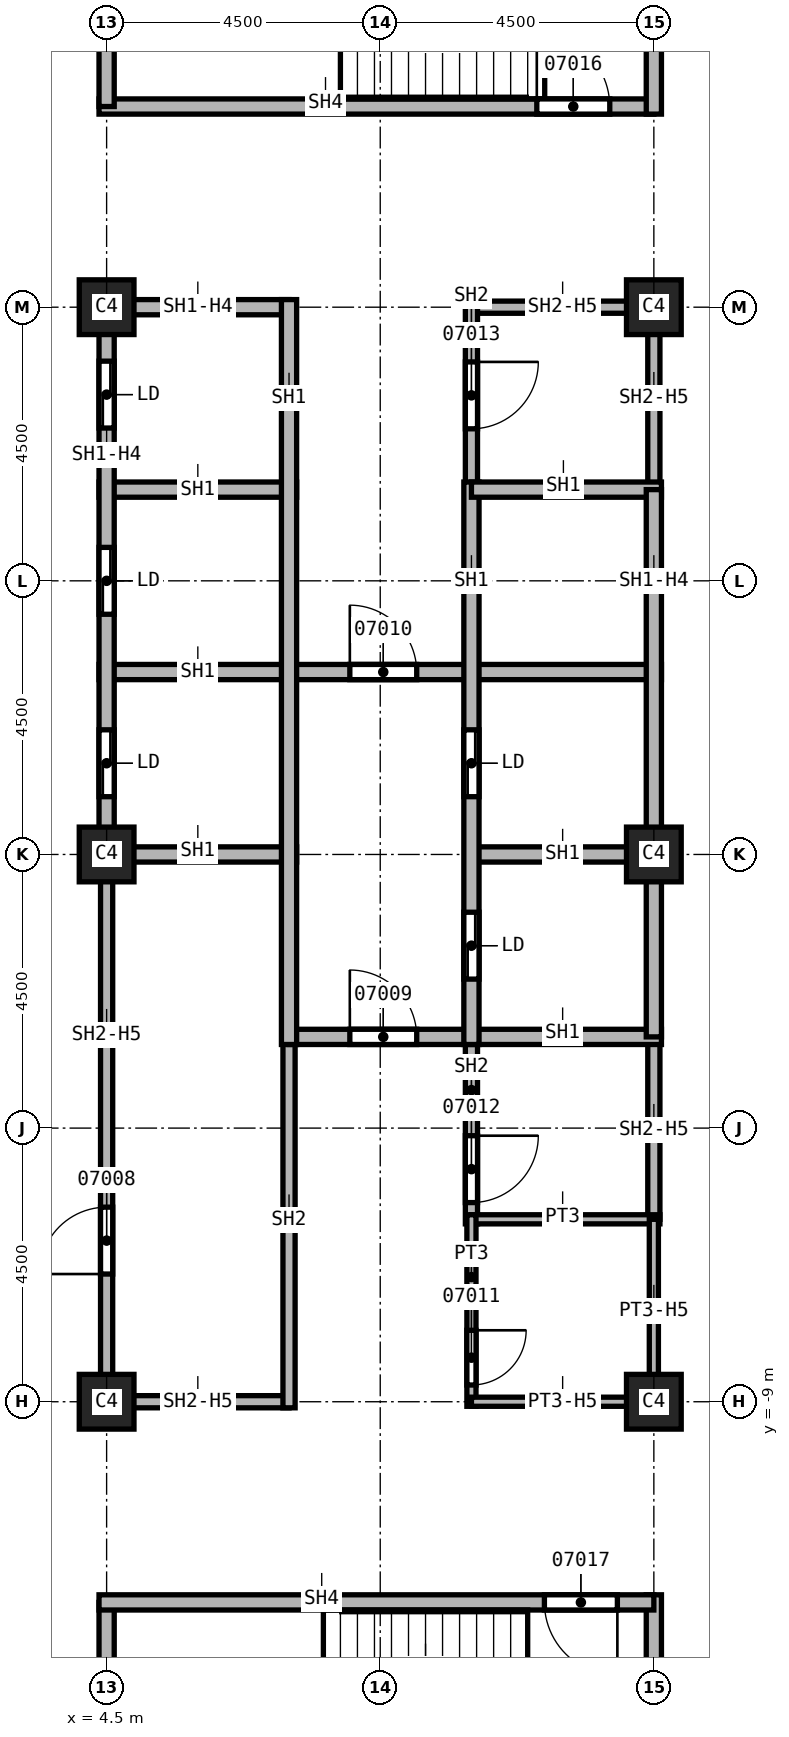
"""IFC4 building model, lengths in metres.
Left out: names, types, materials, properties, quantities, classifications, styles, units other than length and angle.
Written with IfcOpenShell. Run it as: python <this file> out.ifc"""

import sys

from ifc_helpers import new_model, si_unit, direction, frame, frame_2d, origin, origin_2d, place, context, subcontext, project, spatial, rectangle, extrude, element, fill, save


model = new_model("IFC4")
c1 = context("Model", 3, precision=1e-05, world=origin(), true_north=direction((0.0, 1.0)))
c2 = subcontext(c1, "Body", "Model", "MODEL_VIEW")
j1 = project(units=[si_unit("LENGTHUNIT", "METRE"), si_unit("PLANEANGLEUNIT", "RADIAN")], contexts=[c1])
p1 = place(None, origin())
s1 = spatial("IfcSite", under=j1, at=p1, CompositionType="ELEMENT")
p2 = place(p1, origin())
s2 = spatial("IfcBuilding", under=s1, at=p2, CompositionType="ELEMENT")
p3 = place(p2, frame((0.0, 0.0, 138.0)))
s3 = spatial("IfcBuildingStorey", under=s2, at=p3, CompositionType="ELEMENT", Elevation=138.0)
for number, where, z_axis, x_axis in (
    (1, (4.5, 0.0, 0.0), (0.0, 0.0, 1.0), (1.0, 0.0, 0.0)),
    (2, (4.5, 9.0, 0.0), (0.0, 0.0, 1.0), (1.0, 0.0, 0.0)),
    (3, (4.5, -9.0, 0.0), (0.0, 0.0, 1.0), (1.0, 0.0, 0.0)),
    (4, (13.5, 0.0, 0.0), (0.0, 0.0, 1.0), (1.0, 0.0, 0.0)),
    (5, (13.5, 9.0, 0.0), (0.0, 0.0, 1.0), (1.0, 0.0, 0.0)),
    (6, (13.5, -9.0, 0.0), (0.0, 0.0, 1.0), (1.0, 0.0, 0.0)),
):
    element("IfcColumn", number, at=place(p3, frame(where, z_axis=z_axis, x_axis=x_axis)), inside=s3, PredefinedType="COLUMN", context=c2, shape_type="SweptSolid", body=[
        extrude(rectangle(XDim=0.9, YDim=0.9, at=origin_2d()), origin(), (0.0, 0.0, 1.0), 3.7),
    ])
p4 = place(p3, frame((4.5, -9.1, 0.0), z_axis=(0.0, 0.0, 1.0), x_axis=(0.0, 1.0, 0.0)))
e7 = element("IfcWall", 7, at=p4, inside=s3, PredefinedType="SOLIDWALL", context=c2, shape_type="SweptSolid", body=[
    extrude(rectangle(XDim=9.1, YDim=0.2, at=frame_2d((4.55, 0.0))), origin(), (0.0, 0.0, 1.0), 2.938),
])
p5 = place(p4, frame((2.2, 0.0, 0.0)))
e8 = element("IfcOpeningElement", 8, at=p5, cuts=e7, PredefinedType="OPENING", context=c2, shape_type="SweptSolid", body=[
    extrude(rectangle(XDim=1.1, YDim=2.1, at=frame_2d((0.55, 1.05))), frame((0.0, 0.1, 0.0), z_axis=(0.0, -1.0, 0.0), x_axis=(1.0, 0.0, 0.0)), (0.0, 0.0, 1.0), 0.2),
])
p6 = place(p3, frame((7.5, -9.0, 0.0), z_axis=(0.0, 0.0, 1.0), x_axis=(-1.0, 0.0, 0.0)))
e9 = element("IfcWall", 9, at=p6, inside=s3, PredefinedType="SOLIDWALL", context=c2, shape_type="SweptSolid", body=[
    extrude(rectangle(XDim=3.0, YDim=0.2, at=frame_2d((1.5, 0.0))), origin(), (0.0, 0.0, 1.0), 2.938),
])
p7 = place(p3, frame((7.5, -2.875, 0.0), z_axis=(0.0, 0.0, 1.0), x_axis=(0.0, -1.0, 0.0)))
e10 = element("IfcWall", 10, at=p7, inside=s3, PredefinedType="SOLIDWALL", context=c2, shape_type="SweptSolid", body=[
    extrude(rectangle(XDim=6.225, YDim=0.2, at=frame_2d((3.113, 0.0))), origin(), (0.0, 0.0, 1.0), 3.7),
])
p8 = place(p3, frame((10.5, -2.875, 0.0), z_axis=(0.0, 0.0, 1.0), x_axis=(0.0, -1.0, 0.0)))
e11 = element("IfcWall", 11, at=p8, inside=s3, PredefinedType="SOLIDWALL", context=c2, shape_type="SweptSolid", body=[
    extrude(rectangle(XDim=3.2, YDim=0.2, at=frame_2d((1.6, 0.0))), origin(), (0.0, 0.0, 1.0), 3.7),
])
p9 = place(p8, frame((1.75, 0.0, 0.0)))
e12 = element("IfcOpeningElement", 12, at=p9, cuts=e11, PredefinedType="OPENING", context=c2, shape_type="SweptSolid", body=[
    extrude(rectangle(XDim=1.1, YDim=2.1, at=frame_2d((0.55, 1.05))), frame((0.0, 0.1, 0.0), z_axis=(0.0, -1.0, 0.0), x_axis=(1.0, 0.0, 0.0)), (0.0, 0.0, 1.0), 0.2),
])
p10 = place(p3, frame((10.5, 9.0, 0.0), z_axis=(0.0, 0.0, 1.0), x_axis=(1.0, 0.0, 0.0)))
e13 = element("IfcWall", 13, at=p10, inside=s3, PredefinedType="SOLIDWALL", context=c2, shape_type="SweptSolid", body=[
    extrude(rectangle(XDim=3.0, YDim=0.2, at=frame_2d((1.5, 0.0))), origin(), (0.0, 0.0, 1.0), 2.938),
])
p11 = place(p3, frame((10.5, 9.1, 0.0), z_axis=(0.0, 0.0, 1.0), x_axis=(0.0, -1.0, 0.0)))
e14 = element("IfcWall", 14, at=p11, inside=s3, PredefinedType="SOLIDWALL", context=c2, shape_type="SweptSolid", body=[
    extrude(rectangle(XDim=3.225, YDim=0.2, at=frame_2d((1.613, 0.0))), origin(), (0.0, 0.0, 1.0), 3.7),
])
p12 = place(p11, frame((1.0, 0.0, 0.0)))
e15 = element("IfcOpeningElement", 15, at=p12, cuts=e14, PredefinedType="OPENING", context=c2, shape_type="SweptSolid", body=[
    extrude(rectangle(XDim=1.1, YDim=2.1, at=frame_2d((0.55, 1.05))), frame((0.0, 0.1, 0.0), z_axis=(0.0, -1.0, 0.0), x_axis=(1.0, 0.0, 0.0)), (0.0, 0.0, 1.0), 0.2),
])
p13 = place(p3, frame((13.5, -3.0, 0.0), z_axis=(0.0, 0.0, 1.0), x_axis=(0.0, -1.0, 0.0)))
e16 = element("IfcWall", 16, at=p13, inside=s3, PredefinedType="SOLIDWALL", context=c2, shape_type="SweptSolid", body=[
    extrude(rectangle(XDim=3.0, YDim=0.2, at=frame_2d((1.5, 0.0))), origin(), (0.0, 0.0, 1.0), 2.938),
])
p14 = place(p3, frame((13.5, 9.1, 0.0), z_axis=(0.0, 0.0, 1.0), x_axis=(0.0, -1.0, 0.0)))
e17 = element("IfcWall", 17, at=p14, inside=s3, PredefinedType="SOLIDWALL", context=c2, shape_type="SweptSolid", body=[
    extrude(rectangle(XDim=3.1, YDim=0.2, at=frame_2d((1.55, 0.0))), origin(), (0.0, 0.0, 1.0), 2.938),
])
p15 = place(p3, frame((4.375, 0.0, 0.0), z_axis=(0.0, 0.0, 1.0), x_axis=(1.0, 0.0, 0.0)))
e18 = element("IfcWall", 18, at=p15, inside=s3, PredefinedType="SOLIDWALL", context=c2, shape_type="SweptSolid", body=[
    extrude(rectangle(XDim=3.25, YDim=0.25, at=frame_2d((1.625, 0.0))), origin(), (0.0, 0.0, 1.0), 3.7),
])
p16 = place(p3, frame((4.375, 3.0, 0.0), z_axis=(0.0, 0.0, 1.0), x_axis=(1.0, 0.0, 0.0)))
e19 = element("IfcWall", 19, at=p16, inside=s3, PredefinedType="SOLIDWALL", context=c2, shape_type="SweptSolid", body=[
    extrude(rectangle(XDim=9.25, YDim=0.25, at=frame_2d((4.625, 0.0))), origin(), (0.0, 0.0, 1.0), 3.7),
])
p17 = place(p16, frame((4.125, 0.0, 0.0)))
e20 = element("IfcOpeningElement", 20, at=p17, cuts=e19, PredefinedType="OPENING", context=c2, shape_type="SweptSolid", body=[
    extrude(rectangle(XDim=1.1, YDim=2.1, at=frame_2d((0.55, 1.05))), frame((0.0, 0.125, 0.0), z_axis=(0.0, -1.0, 0.0), x_axis=(1.0, 0.0, 0.0)), (0.0, 0.0, 1.0), 0.25),
])
p18 = place(p3, frame((4.375, 6.0, 0.0), z_axis=(0.0, 0.0, 1.0), x_axis=(1.0, 0.0, 0.0)))
e21 = element("IfcWall", 21, at=p18, inside=s3, PredefinedType="SOLIDWALL", context=c2, shape_type="SweptSolid", body=[
    extrude(rectangle(XDim=3.25, YDim=0.25, at=frame_2d((1.625, 0.0))), origin(), (0.0, 0.0, 1.0), 3.7),
])
p19 = place(p3, frame((4.5, 0.0, 0.0), z_axis=(0.0, 0.0, 1.0), x_axis=(0.0, 1.0, 0.0)))
e22 = element("IfcWall", 22, at=p19, inside=s3, PredefinedType="SOLIDWALL", context=c2, shape_type="SweptSolid", body=[
    extrude(rectangle(XDim=9.125, YDim=0.25, at=frame_2d((4.562, 0.0))), origin(), (0.0, 0.0, 1.0), 2.938),
])
p20 = place(p19, frame((0.95, 0.0, 0.0)))
e23 = element("IfcOpeningElement", 23, at=p20, cuts=e22, PredefinedType="OPENING", context=c2, shape_type="SweptSolid", body=[
    extrude(rectangle(XDim=1.1, YDim=2.1, at=frame_2d((0.55, 1.05))), frame((0.0, 0.125, 0.0), z_axis=(0.0, -1.0, 0.0), x_axis=(1.0, 0.0, 0.0)), (0.0, 0.0, 1.0), 0.25),
])
p21 = place(p19, frame((3.95, 0.0, 0.0)))
e24 = element("IfcOpeningElement", 24, at=p21, cuts=e22, PredefinedType="OPENING", context=c2, shape_type="SweptSolid", body=[
    extrude(rectangle(XDim=1.1, YDim=2.1, at=frame_2d((0.55, 1.05))), frame((0.0, 0.125, 0.0), z_axis=(0.0, -1.0, 0.0), x_axis=(1.0, 0.0, 0.0)), (0.0, 0.0, 1.0), 0.25),
])
p22 = place(p19, frame((7.012, 0.0, 0.0)))
e25 = element("IfcOpeningElement", 25, at=p22, cuts=e22, PredefinedType="OPENING", context=c2, shape_type="SweptSolid", body=[
    extrude(rectangle(XDim=1.1, YDim=2.1, at=frame_2d((0.55, 1.05))), frame((0.0, 0.125, 0.0), z_axis=(0.0, -1.0, 0.0), x_axis=(1.0, 0.0, 0.0)), (0.0, 0.0, 1.0), 0.25),
])
p23 = place(p3, frame((4.5, 9.0, 0.0), z_axis=(0.0, 0.0, 1.0), x_axis=(1.0, 0.0, 0.0)))
e26 = element("IfcWall", 26, at=p23, inside=s3, PredefinedType="SOLIDWALL", context=c2, shape_type="SweptSolid", body=[
    extrude(rectangle(XDim=3.0, YDim=0.25, at=frame_2d((1.5, 0.0))), origin(), (0.0, 0.0, 1.0), 2.938),
])
p24 = place(p3, frame((7.5, -3.0, 0.0), z_axis=(0.0, 0.0, 1.0), x_axis=(1.0, 0.0, 0.0)))
e27 = element("IfcWall", 27, at=p24, inside=s3, PredefinedType="SOLIDWALL", context=c2, shape_type="SweptSolid", body=[
    extrude(rectangle(XDim=6.125, YDim=0.25, at=frame_2d((3.062, 0.0))), origin(), (0.0, 0.0, 1.0), 3.7),
])
p25 = place(p24, frame((1.0, 0.0, 0.0)))
e28 = element("IfcOpeningElement", 28, at=p25, cuts=e27, PredefinedType="OPENING", context=c2, shape_type="SweptSolid", body=[
    extrude(rectangle(XDim=1.1, YDim=2.1, at=frame_2d((0.55, 1.05))), frame((0.0, 0.125, 0.0), z_axis=(0.0, -1.0, 0.0), x_axis=(1.0, 0.0, 0.0)), (0.0, 0.0, 1.0), 0.25),
])
p26 = place(p3, frame((7.5, 9.125, 0.0), z_axis=(0.0, 0.0, 1.0), x_axis=(0.0, -1.0, 0.0)))
e29 = element("IfcWall", 29, at=p26, inside=s3, PredefinedType="SOLIDWALL", context=c2, shape_type="SweptSolid", body=[
    extrude(rectangle(XDim=12.25, YDim=0.25, at=frame_2d((6.125, 0.0))), origin(), (0.0, 0.0, 1.0), 3.7),
])
p27 = place(p3, frame((10.5, 0.0, 0.0), z_axis=(0.0, 0.0, 1.0), x_axis=(1.0, 0.0, 0.0)))
e30 = element("IfcWall", 30, at=p27, inside=s3, PredefinedType="SOLIDWALL", context=c2, shape_type="SweptSolid", body=[
    extrude(rectangle(XDim=3.125, YDim=0.25, at=frame_2d((1.562, 0.0))), origin(), (0.0, 0.0, 1.0), 3.7),
])
p28 = place(p3, frame((10.5, 6.125, 0.0), z_axis=(0.0, 0.0, 1.0), x_axis=(0.0, -1.0, 0.0)))
e31 = element("IfcWall", 31, at=p28, inside=s3, PredefinedType="SOLIDWALL", context=c2, shape_type="SweptSolid", body=[
    extrude(rectangle(XDim=9.25, YDim=0.25, at=frame_2d((4.625, 0.0))), origin(), (0.0, 0.0, 1.0), 3.7),
])
p29 = place(p28, frame((7.075, 0.0, 0.0)))
e32 = element("IfcOpeningElement", 32, at=p29, cuts=e31, PredefinedType="OPENING", context=c2, shape_type="SweptSolid", body=[
    extrude(rectangle(XDim=1.1, YDim=2.1, at=frame_2d((0.55, 1.05))), frame((0.0, 0.125, 0.0), z_axis=(0.0, -1.0, 0.0), x_axis=(1.0, 0.0, 0.0)), (0.0, 0.0, 1.0), 0.25),
])
p30 = place(p28, frame((4.075, 0.0, 0.0)))
e33 = element("IfcOpeningElement", 33, at=p30, cuts=e31, PredefinedType="OPENING", context=c2, shape_type="SweptSolid", body=[
    extrude(rectangle(XDim=1.1, YDim=2.1, at=frame_2d((0.55, 1.05))), frame((0.0, 0.125, 0.0), z_axis=(0.0, -1.0, 0.0), x_axis=(1.0, 0.0, 0.0)), (0.0, 0.0, 1.0), 0.25),
])
p31 = place(p3, frame((10.5, 6.0, 0.0), z_axis=(0.0, 0.0, 1.0), x_axis=(1.0, 0.0, 0.0)))
e34 = element("IfcWall", 34, at=p31, inside=s3, PredefinedType="SOLIDWALL", context=c2, shape_type="SweptSolid", body=[
    extrude(rectangle(XDim=3.125, YDim=0.25, at=frame_2d((1.562, 0.0))), origin(), (0.0, 0.0, 1.0), 3.7),
])
p32 = place(p3, frame((13.5, 6.0, 0.0), z_axis=(0.0, 0.0, 1.0), x_axis=(0.0, -1.0, 0.0)))
e35 = element("IfcWall", 35, at=p32, inside=s3, PredefinedType="SOLIDWALL", context=c2, shape_type="SweptSolid", body=[
    extrude(rectangle(XDim=9.0, YDim=0.25, at=frame_2d((4.5, 0.0))), origin(), (0.0, 0.0, 1.0), 2.938),
])
p33 = place(p3, frame((4.375, 12.3, 0.0), z_axis=(0.0, 0.0, 1.0), x_axis=(1.0, 0.0, 0.0)))
e36 = element("IfcWall", 36, at=p33, inside=s3, PredefinedType="SOLIDWALL", context=c2, shape_type="SweptSolid", body=[
    extrude(rectangle(XDim=9.125, YDim=0.25, at=frame_2d((4.562, 0.0))), origin(), (0.0, 0.0, 1.0), 3.7),
])
p34 = place(p33, frame((7.2, 0.0, 0.0)))
e37 = element("IfcOpeningElement", 37, at=p34, cuts=e36, PredefinedType="OPENING", context=c2, shape_type="SweptSolid", body=[
    extrude(rectangle(XDim=1.2, YDim=2.1, at=frame_2d((0.6, 1.05))), frame((0.0, 0.125, 0.0), z_axis=(0.0, -1.0, 0.0), x_axis=(1.0, 0.0, 0.0)), (0.0, 0.0, 1.0), 0.25),
])
for number, where, z_axis, x_axis in (
    (38, (4.5, -16.8, 0.0), (0.0, 0.0, 1.0), (0.0, 1.0, 0.0)),
    (39, (4.5, 12.3, 0.0), (0.0, 0.0, 1.0), (0.0, 1.0, 0.0)),
):
    element("IfcWall", number, at=place(p3, frame(where, z_axis=z_axis, x_axis=x_axis)), inside=s3, PredefinedType="SOLIDWALL", context=c2, shape_type="SweptSolid", body=[
        extrude(rectangle(XDim=4.5, YDim=0.25, at=frame_2d((2.25, 0.0))), origin(), (0.0, 0.0, 1.0), 3.7),
    ])
p35 = place(p3, frame((13.5, -16.925, 0.0), z_axis=(0.0, 0.0, 1.0), x_axis=(0.0, 1.0, 0.0)))
e40 = element("IfcWall", 40, at=p35, inside=s3, PredefinedType="SOLIDWALL", context=c2, shape_type="SweptSolid", body=[
    extrude(rectangle(XDim=4.75, YDim=0.25, at=frame_2d((2.375, 0.0))), origin(), (0.0, 0.0, 1.0), 3.7),
])
p36 = place(p3, frame((13.5, -12.3, 0.0), z_axis=(0.0, 0.0, 1.0), x_axis=(-1.0, 0.0, 0.0)))
e41 = element("IfcWall", 41, at=p36, inside=s3, PredefinedType="SOLIDWALL", context=c2, shape_type="SweptSolid", body=[
    extrude(rectangle(XDim=9.125, YDim=0.25, at=frame_2d((4.562, 0.0))), origin(), (0.0, 0.0, 1.0), 3.7),
])
p37 = place(p36, frame((0.6, 0.0, 0.0)))
e42 = element("IfcOpeningElement", 42, at=p37, cuts=e41, PredefinedType="OPENING", context=c2, shape_type="SweptSolid", body=[
    extrude(rectangle(XDim=1.2, YDim=2.1, at=frame_2d((0.6, 1.05))), frame((0.0, 0.125, 0.0), z_axis=(0.0, -1.0, 0.0), x_axis=(1.0, 0.0, 0.0)), (0.0, 0.0, 1.0), 0.25),
])
p38 = place(p3, frame((13.5, 12.175, 0.0), z_axis=(0.0, 0.0, 1.0), x_axis=(0.0, 1.0, 0.0)))
e43 = element("IfcWall", 43, at=p38, inside=s3, PredefinedType="SOLIDWALL", context=c2, shape_type="SweptSolid", body=[
    extrude(rectangle(XDim=4.75, YDim=0.25, at=frame_2d((2.375, 0.0))), origin(), (0.0, 0.0, 1.0), 3.7),
])
p39 = place(p3, frame((10.5, -6.0, 0.0), z_axis=(0.0, 0.0, 1.0), x_axis=(1.0, 0.0, 0.0)))
e44 = element("IfcWall", 44, at=p39, inside=s3, PredefinedType="PARTITIONING", context=c2, shape_type="SweptSolid", body=[
    extrude(rectangle(XDim=3.1, YDim=0.15, at=frame_2d((1.55, 0.0))), origin(), (0.0, 0.0, 1.0), 3.7),
])
p40 = place(p3, frame((10.5, -5.925, 0.0), z_axis=(0.0, 0.0, 1.0), x_axis=(0.0, -1.0, 0.0)))
e45 = element("IfcWall", 45, at=p40, inside=s3, PredefinedType="PARTITIONING", context=c2, shape_type="SweptSolid", body=[
    extrude(rectangle(XDim=3.15, YDim=0.15, at=frame_2d((1.575, 0.0))), origin(), (0.0, 0.0, 1.0), 3.7),
])
p41 = place(p40, frame((1.9, 0.0, 0.0)))
e46 = element("IfcOpeningElement", 46, at=p41, cuts=e45, PredefinedType="OPENING", context=c2, shape_type="SweptSolid", body=[
    extrude(rectangle(XDim=0.9, YDim=2.1, at=frame_2d((0.45, 1.05))), frame((0.0, 0.075, 0.0), z_axis=(0.0, -1.0, 0.0), x_axis=(1.0, 0.0, 0.0)), (0.0, 0.0, 1.0), 0.15),
])
p42 = place(p3, frame((13.5, -9.0, 0.0), z_axis=(0.0, 0.0, 1.0), x_axis=(-1.0, 0.0, 0.0)))
e47 = element("IfcWall", 47, at=p42, inside=s3, PredefinedType="PARTITIONING", context=c2, shape_type="SweptSolid", body=[
    extrude(rectangle(XDim=3.0, YDim=0.15, at=frame_2d((1.5, 0.0))), origin(), (0.0, 0.0, 1.0), 2.938),
])
p43 = place(p3, frame((13.5, -6.0, 0.0), z_axis=(0.0, 0.0, 1.0), x_axis=(0.0, -1.0, 0.0)))
e48 = element("IfcWall", 48, at=p43, inside=s3, PredefinedType="PARTITIONING", context=c2, shape_type="SweptSolid", body=[
    extrude(rectangle(XDim=3.075, YDim=0.15, at=frame_2d((1.538, 0.0))), origin(), (0.0, 0.0, 1.0), 2.938),
])
p44 = place(p5, origin())
e49 = element("IfcDoor", 49, at=p44, inside=s3, OperationType="SINGLE_SWING_LEFT", PredefinedType="DOOR", context=c2, shape_type="SweptSolid", body=[
    extrude(rectangle(XDim=1.1, YDim=2.1, at=frame_2d((0.55, 1.05))), frame((0.0, 0.025, 0.0), z_axis=(0.0, -1.0, 0.0), x_axis=(1.0, 0.0, 0.0)), (0.0, 0.0, 1.0), 0.05),
])
fill(e8, e49)
p45 = place(p25, origin())
e50 = element("IfcDoor", 50, at=p45, inside=s3, OperationType="SINGLE_SWING_RIGHT", PredefinedType="DOOR", context=c2, shape_type="SweptSolid", body=[
    extrude(rectangle(XDim=1.1, YDim=2.1, at=frame_2d((0.55, 1.05))), frame((0.0, 0.025, 0.0), z_axis=(0.0, -1.0, 0.0), x_axis=(1.0, 0.0, 0.0)), (0.0, 0.0, 1.0), 0.05),
])
fill(e28, e50)
p46 = place(p17, origin())
e51 = element("IfcDoor", 51, at=p46, inside=s3, OperationType="SINGLE_SWING_LEFT", PredefinedType="DOOR", context=c2, shape_type="SweptSolid", body=[
    extrude(rectangle(XDim=1.1, YDim=2.1, at=frame_2d((0.55, 1.05))), frame((0.0, 0.025, 0.0), z_axis=(0.0, -1.0, 0.0), x_axis=(1.0, 0.0, 0.0)), (0.0, 0.0, 1.0), 0.05),
])
fill(e20, e51)
p47 = place(p41, origin())
e52 = element("IfcDoor", 52, at=p47, inside=s3, OperationType="SINGLE_SWING_RIGHT", PredefinedType="DOOR", context=c2, shape_type="SweptSolid", body=[
    extrude(rectangle(XDim=0.9, YDim=2.1, at=frame_2d((0.45, 1.05))), frame((0.0, 0.025, 0.0), z_axis=(0.0, -1.0, 0.0), x_axis=(1.0, 0.0, 0.0)), (0.0, 0.0, 1.0), 0.05),
])
fill(e46, e52)
p48 = place(p9, origin())
e53 = element("IfcDoor", 53, at=p48, inside=s3, OperationType="SINGLE_SWING_LEFT", PredefinedType="DOOR", context=c2, shape_type="SweptSolid", body=[
    extrude(rectangle(XDim=1.1, YDim=2.1, at=frame_2d((0.55, 1.05))), frame((0.0, 0.025, 0.0), z_axis=(0.0, -1.0, 0.0), x_axis=(1.0, 0.0, 0.0)), (0.0, 0.0, 1.0), 0.05),
])
fill(e12, e53)
p49 = place(p12, origin())
e54 = element("IfcDoor", 54, at=p49, inside=s3, OperationType="SINGLE_SWING_RIGHT", PredefinedType="DOOR", context=c2, shape_type="SweptSolid", body=[
    extrude(rectangle(XDim=1.1, YDim=2.1, at=frame_2d((0.55, 1.05))), frame((0.0, 0.025, 0.0), z_axis=(0.0, -1.0, 0.0), x_axis=(1.0, 0.0, 0.0)), (0.0, 0.0, 1.0), 0.05),
])
fill(e15, e54)
p50 = place(p34, origin())
e55 = element("IfcDoor", 55, at=p50, inside=s3, OperationType="SINGLE_SWING_LEFT", PredefinedType="DOOR", context=c2, shape_type="SweptSolid", body=[
    extrude(rectangle(XDim=1.2, YDim=2.1, at=frame_2d((0.6, 1.05))), frame((0.0, 0.025, 0.0), z_axis=(0.0, -1.0, 0.0), x_axis=(1.0, 0.0, 0.0)), (0.0, 0.0, 1.0), 0.05),
])
fill(e37, e55)
p51 = place(p37, origin())
e56 = element("IfcDoor", 56, at=p51, inside=s3, OperationType="SINGLE_SWING_RIGHT", PredefinedType="DOOR", context=c2, shape_type="SweptSolid", body=[
    extrude(rectangle(XDim=1.2, YDim=2.1, at=frame_2d((0.6, 1.05))), frame((0.0, 0.025, 0.0), z_axis=(0.0, -1.0, 0.0), x_axis=(1.0, 0.0, 0.0)), (0.0, 0.0, 1.0), 0.05),
])
fill(e42, e56)
p52 = place(p20, origin())
e57 = element("IfcDoor", 57, at=p52, inside=s3, OperationType="SLIDING_TO_LEFT", PredefinedType="DOOR", context=c2, shape_type="SweptSolid", body=[
    extrude(rectangle(XDim=1.1, YDim=2.1, at=frame_2d((0.55, 1.05))), frame((0.0, 0.025, 0.0), z_axis=(0.0, -1.0, 0.0), x_axis=(1.0, 0.0, 0.0)), (0.0, 0.0, 1.0), 0.05),
])
fill(e23, e57)
p53 = place(p21, origin())
e58 = element("IfcDoor", 58, at=p53, inside=s3, OperationType="SLIDING_TO_LEFT", PredefinedType="DOOR", context=c2, shape_type="SweptSolid", body=[
    extrude(rectangle(XDim=1.1, YDim=2.1, at=frame_2d((0.55, 1.05))), frame((0.0, 0.025, 0.0), z_axis=(0.0, -1.0, 0.0), x_axis=(1.0, 0.0, 0.0)), (0.0, 0.0, 1.0), 0.05),
])
fill(e24, e58)
p54 = place(p22, origin())
e59 = element("IfcDoor", 59, at=p54, inside=s3, OperationType="SLIDING_TO_LEFT", PredefinedType="DOOR", context=c2, shape_type="SweptSolid", body=[
    extrude(rectangle(XDim=1.1, YDim=2.1, at=frame_2d((0.55, 1.05))), frame((0.0, 0.025, 0.0), z_axis=(0.0, -1.0, 0.0), x_axis=(1.0, 0.0, 0.0)), (0.0, 0.0, 1.0), 0.05),
])
fill(e25, e59)
p55 = place(p29, origin())
e60 = element("IfcDoor", 60, at=p55, inside=s3, OperationType="SLIDING_TO_LEFT", PredefinedType="DOOR", context=c2, shape_type="SweptSolid", body=[
    extrude(rectangle(XDim=1.1, YDim=2.1, at=frame_2d((0.55, 1.05))), frame((0.0, 0.025, 0.0), z_axis=(0.0, -1.0, 0.0), x_axis=(1.0, 0.0, 0.0)), (0.0, 0.0, 1.0), 0.05),
])
fill(e32, e60)
p56 = place(p30, origin())
e61 = element("IfcDoor", 61, at=p56, inside=s3, OperationType="SLIDING_TO_LEFT", PredefinedType="DOOR", context=c2, shape_type="SweptSolid", body=[
    extrude(rectangle(XDim=1.1, YDim=2.1, at=frame_2d((0.55, 1.05))), frame((0.0, 0.025, 0.0), z_axis=(0.0, -1.0, 0.0), x_axis=(1.0, 0.0, 0.0)), (0.0, 0.0, 1.0), 0.05),
])
fill(e33, e61)
save(model, sys.argv[1])
